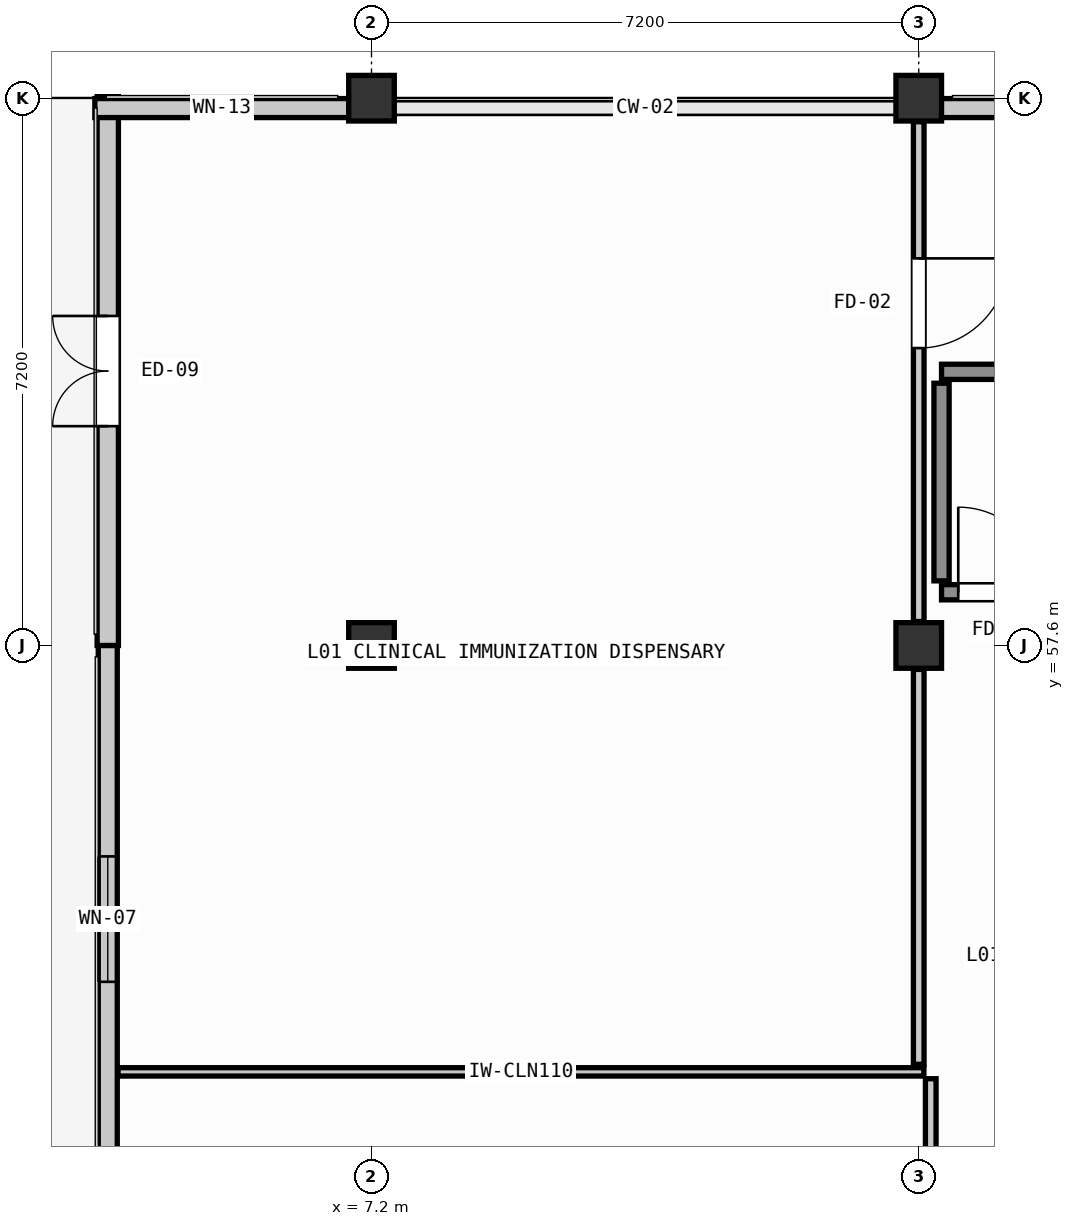
"""IFC4 building model, lengths in metres.
Left out: names, types, materials, properties, quantities, classifications, styles, units other than length and angle.
Written with IfcOpenShell. Run it as: python <this file> out.ifc"""

import sys

from ifc_helpers import new_model, si_unit, direction, frame, frame_2d, origin, origin_2d, place, context, subcontext, project, spatial, rectangle, extrude, element, fill, save


model = new_model("IFC4")
c1 = context("Model", 3, precision=1e-05, world=origin(), true_north=direction((0.0, 1.0)))
c2 = subcontext(c1, "Body", "Model", "MODEL_VIEW")
j1 = project(units=[si_unit("LENGTHUNIT", "METRE"), si_unit("PLANEANGLEUNIT", "RADIAN")], contexts=[c1])
p1 = place(None, origin())
s1 = spatial("IfcSite", under=j1, at=p1, CompositionType="ELEMENT")
p2 = place(p1, origin())
s2 = spatial("IfcBuilding", under=s1, at=p2, CompositionType="ELEMENT")
p3 = place(p2, origin())
s3 = spatial("IfcBuildingStorey", under=s2, at=p3, CompositionType="ELEMENT", Elevation=0.0)
for number, where, z_axis, x_axis in (
    (1, (7.2, 57.6, 0.0), (0.0, 0.0, 1.0), (1.0, 0.0, 0.0)),
    (2, (7.2, 64.8, 0.0), (0.0, 0.0, 1.0), (1.0, 0.0, 0.0)),
    (3, (14.4, 57.6, 0.0), (0.0, 0.0, 1.0), (1.0, 0.0, 0.0)),
    (4, (14.4, 64.8, 0.0), (0.0, 0.0, 1.0), (1.0, 0.0, 0.0)),
):
    element("IfcColumn", number, at=place(p3, frame(where, z_axis=z_axis, x_axis=x_axis)), inside=s3, PredefinedType="COLUMN", context=c2, shape_type="SweptSolid", body=[
        extrude(rectangle(XDim=0.6, YDim=0.6, at=origin_2d()), origin(), (0.0, 0.0, 1.0), 4.56),
    ])
p4 = place(p3, frame((3.73, 50.4, 0.0), z_axis=(0.0, 0.0, 1.0), x_axis=(0.0, 1.0, 0.0)))
e5 = element("IfcWall", 5, at=p4, inside=s3, PredefinedType="SOLIDWALL", context=c2, shape_type="SweptSolid", body=[
    extrude(rectangle(XDim=7.2, YDim=0.25, at=frame_2d((3.6, 0.0))), origin(), (0.0, 0.0, 1.0), 3.76),
])
p5 = place(p4, frame((2.775, 0.0, 2.1)))
e6 = element("IfcOpeningElement", 6, at=p5, cuts=e5, PredefinedType="OPENING", context=c2, shape_type="SweptSolid", body=[
    extrude(rectangle(XDim=1.65, YDim=0.65, at=frame_2d((0.825, 0.325))), frame((0.0, 0.135, 0.0), z_axis=(0.0, -1.0, 0.0), x_axis=(1.0, 0.0, 0.0)), (0.0, 0.0, 1.0), 0.27),
])
p6 = place(p3, frame((3.73, 57.6, 0.0), z_axis=(0.0, 0.0, 1.0), x_axis=(0.0, 1.0, 0.0)))
e7 = element("IfcWall", 7, at=p6, inside=s3, PredefinedType="SOLIDWALL", context=c2, shape_type="SweptSolid", body=[
    extrude(rectangle(XDim=7.22, YDim=0.28, at=frame_2d((3.61, 0.0))), origin(), (0.0, 0.0, 1.0), 3.76),
])
p7 = place(p6, frame((2.885, 0.0, 0.0)))
e8 = element("IfcOpeningElement", 8, at=p7, cuts=e7, PredefinedType="OPENING", context=c2, shape_type="SweptSolid", body=[
    extrude(rectangle(XDim=1.45, YDim=2.25, at=frame_2d((0.725, 1.125))), frame((0.0, 0.15, 0.0), z_axis=(0.0, -1.0, 0.0), x_axis=(1.0, 0.0, 0.0)), (0.0, 0.0, 1.0), 0.3),
])
p8 = place(p3, frame((3.56, 64.67, 0.0), z_axis=(0.0, 0.0, 1.0), x_axis=(1.0, 0.0, 0.0)))
e9 = element("IfcWall", 9, at=p8, inside=s3, PredefinedType="SOLIDWALL", context=c2, shape_type="SweptSolid", body=[
    extrude(rectangle(XDim=3.345, YDim=0.25, at=frame_2d((1.672, 0.0))), origin(), (0.0, 0.0, 1.0), 3.76),
])
p9 = place(p8, frame((1.298, 0.0, 1.5)))
e10 = element("IfcOpeningElement", 10, at=p9, cuts=e9, PredefinedType="OPENING", context=c2, shape_type="SweptSolid", body=[
    extrude(rectangle(XDim=0.75, YDim=0.95, at=frame_2d((0.375, 0.475))), frame((0.0, 0.135, 0.0), z_axis=(0.0, -1.0, 0.0), x_axis=(1.0, 0.0, 0.0)), (0.0, 0.0, 1.0), 0.27),
])
p10 = place(p3, frame((14.695, 64.67, 0.0), z_axis=(0.0, 0.0, 1.0), x_axis=(1.0, 0.0, 0.0)))
e11 = element("IfcWall", 11, at=p10, inside=s3, PredefinedType="SOLIDWALL", context=c2, shape_type="SweptSolid", body=[
    extrude(rectangle(XDim=6.61, YDim=0.25, at=frame_2d((3.305, 0.0))), origin(), (0.0, 0.0, 1.0), 3.76),
])
p11 = place(p10, frame((4.03, 0.0, 1.5)))
e12 = element("IfcOpeningElement", 12, at=p11, cuts=e11, PredefinedType="OPENING", context=c2, shape_type="SweptSolid", body=[
    extrude(rectangle(XDim=0.75, YDim=0.95, at=frame_2d((0.375, 0.475))), frame((0.0, 0.135, 0.0), z_axis=(0.0, -1.0, 0.0), x_axis=(1.0, 0.0, 0.0)), (0.0, 0.0, 1.0), 0.27),
])
p12 = place(p3, frame((14.7, 58.3, 0.0), z_axis=(0.0, 0.0, 1.0), x_axis=(1.0, 0.0, 0.0)))
e13 = element("IfcWall", 13, at=p12, inside=s3, PredefinedType="SHEAR", context=c2, shape_type="SweptSolid", body=[
    extrude(rectangle(XDim=6.775, YDim=0.2, at=frame_2d((3.388, 0.0))), origin(), (0.0, 0.0, 1.0), 4.8),
])
p13 = place(p12, frame((0.22, 0.0, 0.0)))
e14 = element("IfcOpeningElement", 14, at=p13, cuts=e13, PredefinedType="OPENING", context=c2, shape_type="SweptSolid", body=[
    extrude(rectangle(XDim=1.12, YDim=2.14, at=frame_2d((0.56, 1.07))), frame((0.0, 0.11, 0.0), z_axis=(0.0, -1.0, 0.0), x_axis=(1.0, 0.0, 0.0)), (0.0, 0.0, 1.0), 0.22),
])
p14 = place(p3, frame((14.7, 61.2, 0.0), z_axis=(0.0, 0.0, 1.0), x_axis=(1.0, 0.0, 0.0)))
e15 = element("IfcWall", 15, at=p14, inside=s3, PredefinedType="SHEAR", context=c2, shape_type="SweptSolid", body=[
    extrude(rectangle(XDim=6.775, YDim=0.2, at=frame_2d((3.388, 0.0))), origin(), (0.0, 0.0, 1.0), 4.8),
])
p15 = place(p3, frame((14.7, 58.45, 0.0), z_axis=(0.0, 0.0, 1.0), x_axis=(0.0, 1.0, 0.0)))
e16 = element("IfcWall", 16, at=p15, inside=s3, PredefinedType="SHEAR", context=c2, shape_type="SweptSolid", body=[
    extrude(rectangle(XDim=2.6, YDim=0.2, at=frame_2d((1.3, 0.0))), origin(), (0.0, 0.0, 1.0), 4.8),
])
p16 = place(p3, frame((3.865, 51.99, 0.0), z_axis=(0.0, 0.0, 1.0), x_axis=(1.0, 0.0, 0.0)))
e17 = element("IfcWall", 17, at=p16, inside=s3, PredefinedType="PARTITIONING", context=c2, shape_type="SweptSolid", body=[
    extrude(rectangle(XDim=10.603, YDim=0.11, at=frame_2d((5.302, 0.0))), origin(), (0.0, 0.0, 1.0), 3.86),
])
p17 = place(p3, frame((14.558, 51.9, 0.0), z_axis=(0.0, 0.0, 1.0), x_axis=(0.0, -1.0, 0.0)))
e18 = element("IfcWall", 18, at=p17, inside=s3, PredefinedType="PARTITIONING", context=c2, shape_type="SweptSolid", body=[
    extrude(rectangle(XDim=1.185, YDim=0.14, at=frame_2d((0.592, 0.0))), origin(), (0.0, 0.0, 1.0), 3.76),
])
p18 = place(p3, frame((14.4, 64.49, 0.0), z_axis=(0.0, 0.0, 1.0), x_axis=(0.0, -1.0, 0.0)))
e19 = element("IfcWall", 19, at=p18, inside=s3, PredefinedType="PARTITIONING", context=c2, shape_type="SweptSolid", body=[
    extrude(rectangle(XDim=6.575, YDim=0.14, at=frame_2d((3.288, 0.0))), origin(), (0.0, 0.0, 1.0), 3.76),
])
p19 = place(p18, frame((1.798, 0.0, 0.0)))
e20 = element("IfcOpeningElement", 20, at=p19, cuts=e19, PredefinedType="OPENING", context=c2, shape_type="SweptSolid", body=[
    extrude(rectangle(XDim=1.18, YDim=2.16, at=frame_2d((0.59, 1.08))), frame((0.0, 0.08, 0.0), z_axis=(0.0, -1.0, 0.0), x_axis=(1.0, 0.0, 0.0)), (0.0, 0.0, 1.0), 0.16),
])
p20 = place(p3, frame((14.4, 57.285, 0.0), z_axis=(0.0, 0.0, 1.0), x_axis=(0.0, -1.0, 0.0)))
e21 = element("IfcWall", 21, at=p20, inside=s3, PredefinedType="PARTITIONING", context=c2, shape_type="SweptSolid", body=[
    extrude(rectangle(XDim=5.195, YDim=0.14, at=frame_2d((2.597, 0.0))), origin(), (0.0, 0.0, 1.0), 3.76),
])
p21 = place(p5, origin())
e22 = element("IfcWindow", 22, at=p21, inside=s3, PartitioningType="SINGLE_PANEL", PredefinedType="WINDOW", context=c2, shape_type="SweptSolid", body=[
    extrude(rectangle(XDim=1.65, YDim=0.65, at=frame_2d((0.825, 0.325))), frame((0.0, 0.03, 0.0), z_axis=(0.0, -1.0, 0.0), x_axis=(1.0, 0.0, 0.0)), (0.0, 0.0, 1.0), 0.06),
])
fill(e6, e22)
p22 = place(p7, origin())
e23 = element("IfcDoor", 23, at=p22, inside=s3, OperationType="DOUBLE_DOOR_SINGLE_SWING", PredefinedType="DOOR", context=c2, shape_type="SweptSolid", body=[
    extrude(rectangle(XDim=1.45, YDim=2.25, at=frame_2d((0.725, 1.125))), frame((0.0, 0.025, 0.0), z_axis=(0.0, -1.0, 0.0), x_axis=(1.0, 0.0, 0.0)), (0.0, 0.0, 1.0), 0.05),
])
fill(e8, e23)
p23 = place(p9, origin())
e24 = element("IfcWindow", 24, at=p23, inside=s3, PartitioningType="SINGLE_PANEL", PredefinedType="WINDOW", context=c2, shape_type="SweptSolid", body=[
    extrude(rectangle(XDim=0.75, YDim=0.95, at=frame_2d((0.375, 0.475))), frame((0.0, 0.03, 0.0), z_axis=(0.0, -1.0, 0.0), x_axis=(1.0, 0.0, 0.0)), (0.0, 0.0, 1.0), 0.06),
])
fill(e10, e24)
p24 = place(p13, origin())
e25 = element("IfcDoor", 25, at=p24, inside=s3, OperationType="SINGLE_SWING_LEFT", PredefinedType="DOOR", context=c2, shape_type="SweptSolid", body=[
    extrude(rectangle(XDim=1.12, YDim=2.14, at=frame_2d((0.56, 1.07))), frame((0.0, 0.025, 0.0), z_axis=(0.0, -1.0, 0.0), x_axis=(1.0, 0.0, 0.0)), (0.0, 0.0, 1.0), 0.05),
])
fill(e14, e25)
p25 = place(p19, origin())
e26 = element("IfcDoor", 26, at=p25, inside=s3, OperationType="SINGLE_SWING_LEFT", PredefinedType="DOOR", context=c2, shape_type="SweptSolid", body=[
    extrude(rectangle(XDim=1.18, YDim=2.16, at=frame_2d((0.59, 1.08))), frame((0.0, 0.025, 0.0), z_axis=(0.0, -1.0, 0.0), x_axis=(1.0, 0.0, 0.0)), (0.0, 0.0, 1.0), 0.05),
])
fill(e20, e26)
save(model, sys.argv[1])
